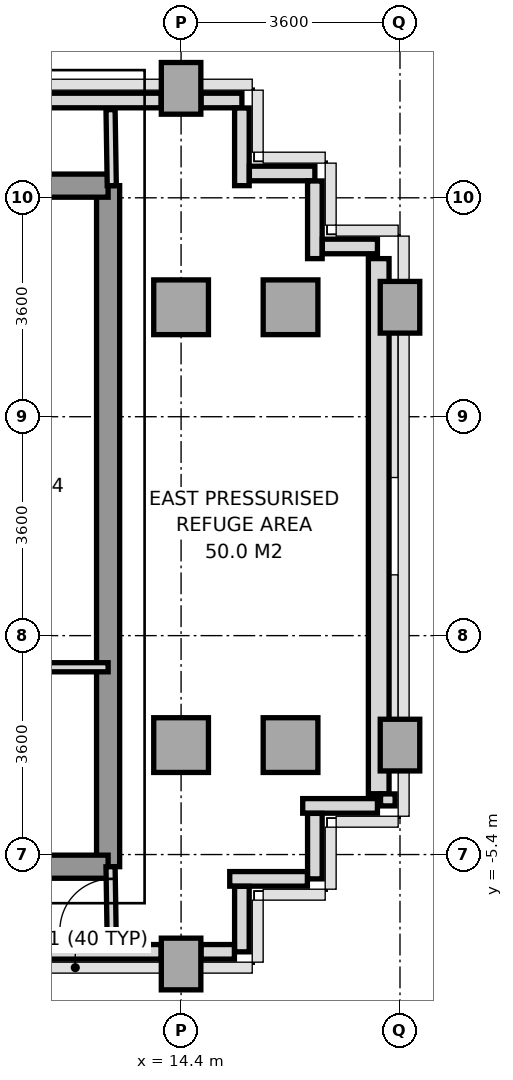
"""IFC4 building model, lengths in metres.
Left out: names, types, materials, properties, quantities, classifications, styles, units other than length and angle.
Written with IfcOpenShell. Run it as: python <this file> out.ifc"""

import sys

from ifc_helpers import new_model, si_unit, direction, frame, frame_2d, origin, origin_2d, place, context, subcontext, project, spatial, rectangle, extrude, source, transform, mapped, element, fill, save


model = new_model("IFC4")
c1 = context("Model", 3, precision=1e-05, world=origin(), true_north=direction((0.0, 1.0)))
c2 = subcontext(c1, "Body", "Model", "MODEL_VIEW")
j1 = project(units=[si_unit("LENGTHUNIT", "METRE"), si_unit("PLANEANGLEUNIT", "RADIAN")], contexts=[c1])
p1 = place(None, origin())
s1 = spatial("IfcSite", under=j1, at=p1, CompositionType="ELEMENT")
p2 = place(p1, origin())
s2 = spatial("IfcBuilding", under=s1, at=p2, CompositionType="ELEMENT")
p3 = place(p2, frame((0.0, 0.0, 214.8)))
s3 = spatial("IfcBuildingStorey", under=s2, at=p3, CompositionType="ELEMENT", Elevation=214.8)
m1 = source(origin(), c2, "Body", "SweptSolid", [
    extrude(rectangle(XDim=0.65, YDim=0.85, at=origin_2d()), origin(), (0.0, 0.0, 1.0), 4.41),
])
p4 = place(p3, frame((14.4, -7.2, 0.0), z_axis=(0.0, 0.0, 1.0), x_axis=(1.0, 0.0, 0.0)))
e1 = element("IfcColumn", 1, at=p4, inside=s3, PredefinedType="COLUMN", context=c2, shape_type="MappedRepresentation", body=[
    mapped(m1, transform((0.0, 0.0, 0.0), x_axis=(1.0, 0.0, 0.0), y_axis=(0.0, 1.0, 0.0), z_axis=(0.0, 0.0, 1.0), scale=1.0)),
])
m2 = source(origin(), c2, "Body", "SweptSolid", [
    extrude(rectangle(XDim=0.9, YDim=0.9, at=origin_2d()), origin(), (0.0, 0.0, 1.0), 4.41),
])
for number, where, z_axis, x_axis in (
    (2, (14.4, -3.6, 0.0), (0.0, 0.0, 1.0), (1.0, 0.0, 0.0)),
    (3, (14.4, 3.6, 0.0), (0.0, 0.0, 1.0), (1.0, 0.0, 0.0)),
):
    element("IfcColumn", number, at=place(p3, frame(where, z_axis=z_axis, x_axis=x_axis)), inside=s3, PredefinedType="COLUMN", context=c2, shape_type="MappedRepresentation", body=[
        mapped(m2, transform((0.0, 0.0, 0.0), x_axis=(1.0, 0.0, 0.0), y_axis=(0.0, 1.0, 0.0), z_axis=(0.0, 0.0, 1.0), scale=1.0)),
    ])
p5 = place(p3, frame((14.4, 7.2, 0.0), z_axis=(0.0, 0.0, 1.0), x_axis=(1.0, 0.0, 0.0)))
e4 = element("IfcColumn", 4, at=p5, inside=s3, PredefinedType="COLUMN", context=c2, shape_type="MappedRepresentation", body=[
    mapped(m1, transform((0.0, 0.0, 0.0), x_axis=(1.0, 0.0, 0.0), y_axis=(0.0, 1.0, 0.0), z_axis=(0.0, 0.0, 1.0), scale=1.0)),
])
for number, where, z_axis, x_axis in (
    (5, (16.2, -3.6, 0.0), (0.0, 0.0, 1.0), (1.0, 0.0, 0.0)),
    (6, (16.2, 3.6, 0.0), (0.0, 0.0, 1.0), (1.0, 0.0, 0.0)),
):
    element("IfcColumn", number, at=place(p3, frame(where, z_axis=z_axis, x_axis=x_axis)), inside=s3, PredefinedType="COLUMN", context=c2, shape_type="MappedRepresentation", body=[
        mapped(m2, transform((0.0, 0.0, 0.0), x_axis=(1.0, 0.0, 0.0), y_axis=(0.0, 1.0, 0.0), z_axis=(0.0, 0.0, 1.0), scale=1.0)),
    ])
for number, where, z_axis, x_axis in (
    (7, (18.0, -3.6, 0.0), (0.0, 0.0, 1.0), (1.0, 0.0, 0.0)),
    (8, (18.0, 3.6, 0.0), (0.0, 0.0, 1.0), (1.0, 0.0, 0.0)),
):
    element("IfcColumn", number, at=place(p3, frame(where, z_axis=z_axis, x_axis=x_axis)), inside=s3, PredefinedType="COLUMN", context=c2, shape_type="MappedRepresentation", body=[
        mapped(m1, transform((0.0, 0.0, 0.0), x_axis=(1.0, 0.0, 0.0), y_axis=(0.0, 1.0, 0.0), z_axis=(0.0, 0.0, 1.0), scale=1.0)),
    ])
p6 = place(p3, frame((17.65, -4.4, 0.0), z_axis=(0.0, 0.0, 1.0), x_axis=(0.0, 1.0, 0.0)))
e9 = element("IfcWall", 9, at=p6, inside=s3, PredefinedType="SOLIDWALL", context=c2, shape_type="SweptSolid", body=[
    extrude(rectangle(XDim=8.8, YDim=0.34, at=frame_2d((4.4, 0.0))), origin(), (0.0, 0.0, 1.0), 3.76),
])
p7 = place(p3, frame((17.629, -4.6, 0.0), z_axis=(0.0, 0.0, 1.0), x_axis=(-1.0, 0.0, 0.0)))
e10 = element("IfcWall", 10, at=p7, inside=s3, PredefinedType="PARAPET", context=c2, shape_type="SweptSolid", body=[
    extrude(rectangle(XDim=1.229, YDim=0.24, at=frame_2d((0.615, 0.0))), origin(), (0.0, 0.0, 1.0), 1.15),
])
p8 = place(p3, frame((16.6, -4.723, 0.0), z_axis=(0.0, 0.0, 1.0), x_axis=(0.0, -1.0, 0.0)))
e11 = element("IfcWall", 11, at=p8, inside=s3, PredefinedType="PARAPET", context=c2, shape_type="SweptSolid", body=[
    extrude(rectangle(XDim=1.077, YDim=0.24, at=frame_2d((0.539, 0.0))), origin(), (0.0, 0.0, 1.0), 1.15),
])
p9 = place(p3, frame((16.477, -5.8, 0.0), z_axis=(0.0, 0.0, 1.0), x_axis=(-1.0, 0.0, 0.0)))
e12 = element("IfcWall", 12, at=p9, inside=s3, PredefinedType="PARAPET", context=c2, shape_type="SweptSolid", body=[
    extrude(rectangle(XDim=1.277, YDim=0.24, at=frame_2d((0.639, 0.0))), origin(), (0.0, 0.0, 1.0), 1.15),
])
p10 = place(p3, frame((15.4, -5.923, 0.0), z_axis=(0.0, 0.0, 1.0), x_axis=(0.0, -1.0, 0.0)))
e13 = element("IfcWall", 13, at=p10, inside=s3, PredefinedType="PARAPET", context=c2, shape_type="SweptSolid", body=[
    extrude(rectangle(XDim=1.077, YDim=0.24, at=frame_2d((0.539, 0.0))), origin(), (0.0, 0.0, 1.0), 1.15),
])
p11 = place(p3, frame((15.277, -7.0, 0.0), z_axis=(0.0, 0.0, 1.0), x_axis=(-1.0, 0.0, 0.0)))
e14 = element("IfcWall", 14, at=p11, inside=s3, PredefinedType="PARAPET", context=c2, shape_type="SweptSolid", body=[
    extrude(rectangle(XDim=0.549, YDim=0.24, at=frame_2d((0.274, 0.0))), origin(), (0.0, 0.0, 1.0), 1.15),
])
p12 = place(p3, frame((14.072, -7.0, 0.0), z_axis=(0.0, 0.0, 1.0), x_axis=(-1.0, 0.0, 0.0)))
e15 = element("IfcWall", 15, at=p12, inside=s3, PredefinedType="PARAPET", context=c2, shape_type="SweptSolid", body=[
    extrude(rectangle(XDim=4.872, YDim=0.24, at=frame_2d((2.436, 0.0))), origin(), (0.0, 0.0, 1.0), 1.15),
])
p13 = place(p3, frame((11.403, 7.0, 0.0), z_axis=(0.0, 0.0, 1.0), x_axis=(1.0, 0.0, 0.0)))
e16 = element("IfcWall", 16, at=p13, inside=s3, PredefinedType="PARAPET", context=c2, shape_type="SweptSolid", body=[
    extrude(rectangle(XDim=2.669, YDim=0.24, at=frame_2d((1.334, 0.0))), origin(), (0.0, 0.0, 1.0), 1.15),
])
p14 = place(p3, frame((14.728, 7.0, 0.0), z_axis=(0.0, 0.0, 1.0), x_axis=(1.0, 0.0, 0.0)))
e17 = element("IfcWall", 17, at=p14, inside=s3, PredefinedType="PARAPET", context=c2, shape_type="SweptSolid", body=[
    extrude(rectangle(XDim=0.672, YDim=0.24, at=frame_2d((0.336, 0.0))), origin(), (0.0, 0.0, 1.0), 1.15),
])
p15 = place(p3, frame((15.4, 6.877, 0.0), z_axis=(0.0, 0.0, 1.0), x_axis=(0.0, -1.0, 0.0)))
e18 = element("IfcWall", 18, at=p15, inside=s3, PredefinedType="PARAPET", context=c2, shape_type="SweptSolid", body=[
    extrude(rectangle(XDim=1.277, YDim=0.24, at=frame_2d((0.638, 0.0))), origin(), (0.0, 0.0, 1.0), 1.15),
])
p16 = place(p3, frame((15.523, 5.8, 0.0), z_axis=(0.0, 0.0, 1.0), x_axis=(1.0, 0.0, 0.0)))
e19 = element("IfcWall", 19, at=p16, inside=s3, PredefinedType="PARAPET", context=c2, shape_type="SweptSolid", body=[
    extrude(rectangle(XDim=1.077, YDim=0.24, at=frame_2d((0.539, 0.0))), origin(), (0.0, 0.0, 1.0), 1.15),
])
p17 = place(p3, frame((16.6, 5.677, 0.0), z_axis=(0.0, 0.0, 1.0), x_axis=(0.0, -1.0, 0.0)))
e20 = element("IfcWall", 20, at=p17, inside=s3, PredefinedType="PARAPET", context=c2, shape_type="SweptSolid", body=[
    extrude(rectangle(XDim=1.277, YDim=0.24, at=frame_2d((0.639, 0.0))), origin(), (0.0, 0.0, 1.0), 1.15),
])
p18 = place(p3, frame((16.723, 4.6, 0.0), z_axis=(0.0, 0.0, 1.0), x_axis=(1.0, 0.0, 0.0)))
e21 = element("IfcWall", 21, at=p18, inside=s3, PredefinedType="PARAPET", context=c2, shape_type="SweptSolid", body=[
    extrude(rectangle(XDim=0.906, YDim=0.24, at=frame_2d((0.453, 0.0))), origin(), (0.0, 0.0, 1.0), 1.15),
])
p19 = place(p3, frame((17.8, -4.403, 0.0), z_axis=(0.0, 0.0, 1.0), x_axis=(0.0, -1.0, 0.0)))
e22 = element("IfcWall", 22, at=p19, inside=s3, PredefinedType="PARAPET", context=c2, shape_type="SweptSolid", body=[
    extrude(rectangle(XDim=0.197, YDim=0.24, at=frame_2d((0.099, 0.0))), origin(), (0.0, 0.0, 1.0), 1.15),
])
p20 = place(p3, frame((13.2, -5.6, 0.0), z_axis=(0.0, 0.0, 1.0), x_axis=(0.0, 1.0, 0.0)))
e23 = element("IfcWall", 23, at=p20, inside=s3, PredefinedType="SHEAR", context=c2, shape_type="SweptSolid", body=[
    extrude(rectangle(XDim=11.2, YDim=0.38, at=frame_2d((5.6, 0.0))), origin(), (0.0, 0.0, 1.0), 4.41),
])
p21 = place(p3, frame((11.356, 5.6, 0.0), z_axis=(0.0, 0.0, 1.0), x_axis=(1.0, 0.0, 0.0)))
e24 = element("IfcWall", 24, at=p21, inside=s3, PredefinedType="SHEAR", context=c2, shape_type="SweptSolid", body=[
    extrude(rectangle(XDim=1.844, YDim=0.38, at=frame_2d((0.922, 0.0))), origin(), (0.0, 0.0, 1.0), 4.41),
])
p22 = place(p3, frame((5.4, -5.6, 0.0), z_axis=(0.0, 0.0, 1.0), x_axis=(1.0, 0.0, 0.0)))
e25 = element("IfcWall", 25, at=p22, inside=s3, PredefinedType="SHEAR", context=c2, shape_type="SweptSolid", body=[
    extrude(rectangle(XDim=7.8, YDim=0.38, at=frame_2d((3.9, 0.0))), origin(), (0.0, 0.0, 1.0), 4.41),
])
p23 = place(p22, frame((5.85, 0.0, 0.0)))
e26 = element("IfcOpeningElement", 26, at=p23, cuts=e25, PredefinedType="OPENING", context=c2, shape_type="SweptSolid", body=[
    extrude(rectangle(XDim=0.8, YDim=2.1, at=frame_2d((0.4, 1.05))), frame((0.0, 0.2, 0.0), z_axis=(0.0, -1.0, 0.0), x_axis=(1.0, 0.0, 0.0)), (0.0, 0.0, 1.0), 0.4),
])
p24 = place(p22, frame((1.2, 0.0, 0.0)))
e27 = element("IfcOpeningElement", 27, at=p24, cuts=e25, PredefinedType="OPENING", context=c2, shape_type="SweptSolid", body=[
    extrude(rectangle(XDim=0.85, YDim=2.1, at=frame_2d((0.425, 1.05))), frame((0.0, 0.2, 0.0), z_axis=(0.0, -1.0, 0.0), x_axis=(1.0, 0.0, 0.0)), (0.0, 0.0, 1.0), 0.4),
])
p25 = place(p22, frame((3.4, 0.0, 0.0)))
e28 = element("IfcOpeningElement", 28, at=p25, cuts=e25, PredefinedType="OPENING", context=c2, shape_type="SweptSolid", body=[
    extrude(rectangle(XDim=0.85, YDim=2.1, at=frame_2d((0.425, 1.05))), frame((0.0, 0.2, 0.0), z_axis=(0.0, -1.0, 0.0), x_axis=(1.0, 0.0, 0.0)), (0.0, 0.0, 1.0), 0.4),
])
p26 = place(p3, frame((11.02, -2.32, 0.0), z_axis=(0.0, 0.0, 1.0), x_axis=(1.0, 0.0, 0.0)))
e29 = element("IfcWall", 29, at=p26, inside=s3, PredefinedType="PARTITIONING", context=c2, shape_type="SweptSolid", body=[
    extrude(rectangle(XDim=2.18, YDim=0.15, at=frame_2d((1.09, 0.0))), origin(), (0.0, 0.0, 1.0), 4.41),
])
p27 = place(p3, frame((13.26, -6.85, 0.0), z_axis=(0.0, 0.0, 1.0), x_axis=(-0.016013571389, 0.999871774545, 0.0)))
e30 = element("IfcWall", 30, at=p27, inside=s3, PredefinedType="PARTITIONING", context=c2, shape_type="SweptSolid", body=[
    extrude(rectangle(XDim=1.25, YDim=0.15, at=frame_2d((0.625, 0.0))), origin(), (0.0, 0.0, 1.0), 4.41),
])
p28 = place(p27, frame((0.2, 0.0, 0.0)))
e31 = element("IfcOpeningElement", 31, at=p28, cuts=e30, PredefinedType="OPENING", context=c2, shape_type="SweptSolid", body=[
    extrude(rectangle(XDim=0.85, YDim=2.1, at=frame_2d((0.425, 1.05))), frame((0.0, 0.085, 0.0), z_axis=(0.0, -1.0, 0.0), x_axis=(1.0, 0.0, 0.0)), (0.0, 0.0, 1.0), 0.17),
])
p29 = place(p3, frame((13.26, 5.6, 0.0), z_axis=(0.0, 0.0, 1.0), x_axis=(-0.016013571389, 0.999871774545, 0.0)))
e32 = element("IfcWall", 32, at=p29, inside=s3, PredefinedType="PARTITIONING", context=c2, shape_type="SweptSolid", body=[
    extrude(rectangle(XDim=1.25, YDim=0.15, at=frame_2d((0.625, 0.0))), origin(), (0.0, 0.0, 1.0), 4.41),
])
m3 = source(origin(), c2, "Body", "SweptSolid", [
    extrude(rectangle(XDim=0.85, YDim=2.1, at=frame_2d((0.425, 1.05))), frame((0.0, 0.025, 0.0), z_axis=(0.0, -1.0, 0.0), x_axis=(1.0, 0.0, 0.0)), (0.0, 0.0, 1.0), 0.05),
])
p30 = place(p28, origin())
e33 = element("IfcDoor", 33, at=p30, inside=s3, OperationType="SINGLE_SWING_LEFT", PredefinedType="DOOR", context=c2, shape_type="MappedRepresentation", body=[
    mapped(m3, transform((0.0, 0.0, 0.0), x_axis=(1.0, 0.0, 0.0), y_axis=(0.0, 1.0, 0.0), z_axis=(0.0, 0.0, 1.0), scale=1.0)),
])
fill(e31, e33)
save(model, sys.argv[1])
